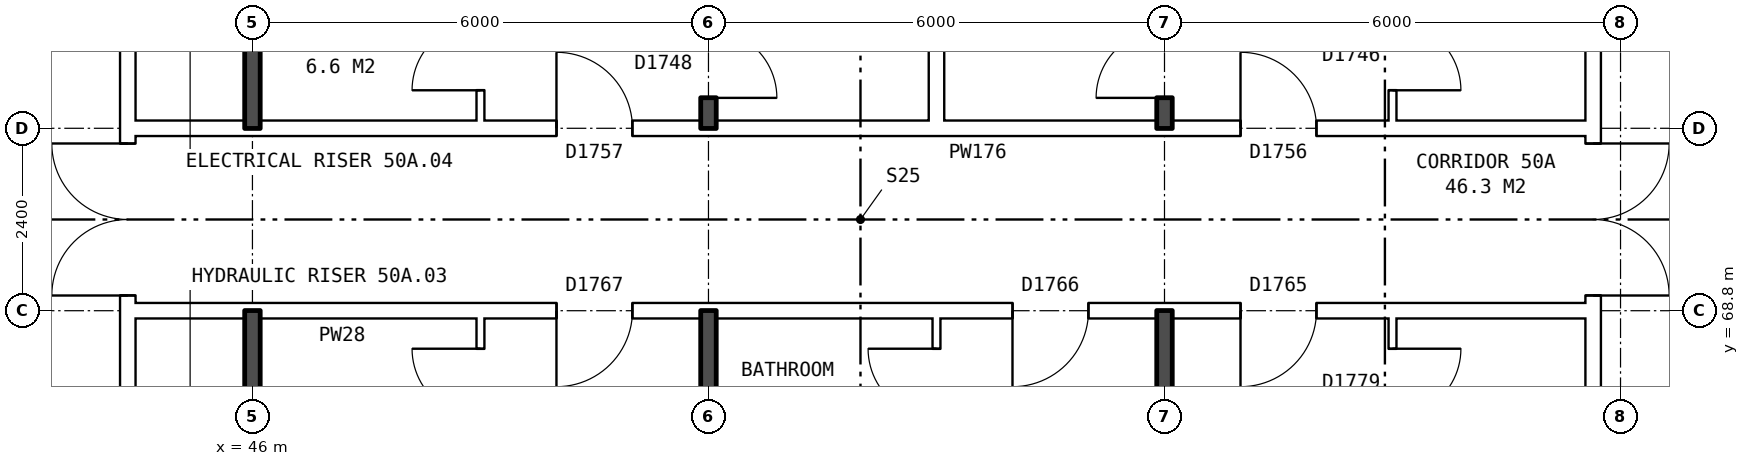
"""IFC4 building model, lengths in metres.
Left out: names, types, materials, properties, quantities, classifications, styles, units other than length and angle.
Written with IfcOpenShell. Run it as: python <this file> out.ifc"""

import sys

from ifc_helpers import new_model, si_unit, direction, frame, frame_2d, origin, place, context, subcontext, project, spatial, rectangle, extrude, element, fill, save


model = new_model("IFC4")
c1 = context("Model", 3, precision=1e-05, world=origin(), true_north=direction((0.0, 1.0)))
c2 = subcontext(c1, "Body", "Model", "MODEL_VIEW")
j1 = project(units=[si_unit("LENGTHUNIT", "METRE"), si_unit("PLANEANGLEUNIT", "RADIAN")], contexts=[c1])
p1 = place(None, origin())
s1 = spatial("IfcSite", under=j1, at=p1, CompositionType="ELEMENT")
p2 = place(p1, origin())
s2 = spatial("IfcBuilding", under=s1, at=p2, CompositionType="ELEMENT")
p3 = place(p2, frame((0.0, 0.0, 178.9)))
s3 = spatial("IfcBuildingStorey", under=s2, at=p3, CompositionType="ELEMENT", Elevation=178.9)
p4 = place(p3, frame((63.64, 63.9, 0.0), z_axis=(0.0, 0.0, 1.0), x_axis=(0.0, 1.0, 0.0)))
e1 = element("IfcWall", 1, at=p4, inside=s3, PredefinedType="PARTITIONING", context=c2, shape_type="SweptSolid", body=[
    extrude(rectangle(XDim=12.2, YDim=0.2, at=frame_2d((6.1, 0.0))), origin(), (0.0, 0.0, 1.0), 2.85),
])
p5 = place(p4, frame((5.1, 0.0, 0.0)))
e2 = element("IfcOpeningElement", 2, at=p5, cuts=e1, PredefinedType="OPENING", context=c2, shape_type="SweptSolid", body=[
    extrude(rectangle(XDim=2.0, YDim=2.1, at=frame_2d((1.0, 1.05))), frame((0.0, 0.11, 0.0), z_axis=(0.0, -1.0, 0.0), x_axis=(1.0, 0.0, 0.0)), (0.0, 0.0, 1.0), 0.22),
])
p6 = place(p3, frame((44.36, 63.9, 0.0), z_axis=(0.0, 0.0, 1.0), x_axis=(0.0, 1.0, 0.0)))
e3 = element("IfcWall", 3, at=p6, inside=s3, PredefinedType="PARTITIONING", context=c2, shape_type="SweptSolid", body=[
    extrude(rectangle(XDim=12.2, YDim=0.2, at=frame_2d((6.1, 0.0))), origin(), (0.0, 0.0, 1.0), 2.85),
])
p7 = place(p6, frame((5.1, 0.0, 0.0)))
e4 = element("IfcOpeningElement", 4, at=p7, cuts=e3, PredefinedType="OPENING", context=c2, shape_type="SweptSolid", body=[
    extrude(rectangle(XDim=2.0, YDim=2.1, at=frame_2d((1.0, 1.05))), frame((0.0, 0.11, 0.0), z_axis=(0.0, -1.0, 0.0), x_axis=(1.0, 0.0, 0.0)), (0.0, 0.0, 1.0), 0.22),
])
p8 = place(p3, frame((44.36, 68.8, 0.0), z_axis=(0.0, 0.0, 1.0), x_axis=(1.0, 0.0, 0.0)))
e5 = element("IfcWall", 5, at=p8, inside=s3, PredefinedType="PARTITIONING", context=c2, shape_type="SweptSolid", body=[
    extrude(rectangle(XDim=19.28, YDim=0.2, at=frame_2d((9.64, 0.0))), origin(), (0.0, 0.0, 1.0), 2.85),
])
p9 = place(p8, frame((14.64, 0.0, 0.0)))
e6 = element("IfcOpeningElement", 6, at=p9, cuts=e5, PredefinedType="OPENING", context=c2, shape_type="SweptSolid", body=[
    extrude(rectangle(XDim=1.0, YDim=2.1, at=frame_2d((0.5, 1.05))), frame((0.0, 0.11, 0.0), z_axis=(0.0, -1.0, 0.0), x_axis=(1.0, 0.0, 0.0)), (0.0, 0.0, 1.0), 0.22),
])
p10 = place(p8, frame((11.64, 0.0, 0.0)))
e7 = element("IfcOpeningElement", 7, at=p10, cuts=e5, PredefinedType="OPENING", context=c2, shape_type="SweptSolid", body=[
    extrude(rectangle(XDim=1.0, YDim=2.1, at=frame_2d((0.5, 1.05))), frame((0.0, 0.11, 0.0), z_axis=(0.0, -1.0, 0.0), x_axis=(1.0, 0.0, 0.0)), (0.0, 0.0, 1.0), 0.22),
])
p11 = place(p8, frame((5.64, 0.0, 0.0)))
e8 = element("IfcOpeningElement", 8, at=p11, cuts=e5, PredefinedType="OPENING", context=c2, shape_type="SweptSolid", body=[
    extrude(rectangle(XDim=1.0, YDim=2.1, at=frame_2d((0.5, 1.05))), frame((0.0, 0.11, 0.0), z_axis=(0.0, -1.0, 0.0), x_axis=(1.0, 0.0, 0.0)), (0.0, 0.0, 1.0), 0.22),
])
p12 = place(p3, frame((44.36, 71.2, 0.0), z_axis=(0.0, 0.0, 1.0), x_axis=(1.0, 0.0, 0.0)))
e9 = element("IfcWall", 9, at=p12, inside=s3, PredefinedType="PARTITIONING", context=c2, shape_type="SweptSolid", body=[
    extrude(rectangle(XDim=19.28, YDim=0.2, at=frame_2d((9.64, 0.0))), origin(), (0.0, 0.0, 1.0), 2.85),
])
p13 = place(p12, frame((14.64, 0.0, 0.0)))
e10 = element("IfcOpeningElement", 10, at=p13, cuts=e9, PredefinedType="OPENING", context=c2, shape_type="SweptSolid", body=[
    extrude(rectangle(XDim=1.0, YDim=2.1, at=frame_2d((0.5, 1.05))), frame((0.0, 0.11, 0.0), z_axis=(0.0, -1.0, 0.0), x_axis=(1.0, 0.0, 0.0)), (0.0, 0.0, 1.0), 0.22),
])
p14 = place(p12, frame((5.64, 0.0, 0.0)))
e11 = element("IfcOpeningElement", 11, at=p14, cuts=e9, PredefinedType="OPENING", context=c2, shape_type="SweptSolid", body=[
    extrude(rectangle(XDim=1.0, YDim=2.1, at=frame_2d((0.5, 1.05))), frame((0.0, 0.11, 0.0), z_axis=(0.0, -1.0, 0.0), x_axis=(1.0, 0.0, 0.0)), (0.0, 0.0, 1.0), 0.22),
])
for number, where, z_axis, x_axis in (
    (12, (46.0, 63.8, 0.0), (0.0, 0.0, 1.0), (0.0, 1.0, 0.0)),
    (13, (46.0, 71.2, 0.0), (0.0, 0.0, 1.0), (0.0, 1.0, 0.0)),
):
    element("IfcWall", number, at=place(p3, frame(where, z_axis=z_axis, x_axis=x_axis)), inside=s3, PredefinedType="SOLIDWALL", context=c2, shape_type="SweptSolid", body=[
        extrude(rectangle(XDim=5.0, YDim=0.2, at=frame_2d((2.5, 0.0))), origin(), (0.0, 0.0, 1.0), 2.85),
    ])
p15 = place(p3, frame((49.0, 54.36, 0.0), z_axis=(0.0, 0.0, 1.0), x_axis=(0.0, 1.0, 0.0)))
e14 = element("IfcWall", 14, at=p15, inside=s3, PredefinedType="PARTITIONING", context=c2, shape_type="SweptSolid", body=[
    extrude(rectangle(XDim=14.34, YDim=0.1, at=frame_2d((7.17, 0.0))), origin(), (0.0, 0.0, 1.0), 2.85),
])
p16 = place(p15, frame((6.7, 0.0, 0.0)))
e15 = element("IfcOpeningElement", 15, at=p16, cuts=e14, PredefinedType="OPENING", context=c2, shape_type="SweptSolid", body=[
    extrude(rectangle(XDim=0.9, YDim=2.1, at=frame_2d((0.45, 1.05))), frame((0.0, 0.06, 0.0), z_axis=(0.0, -1.0, 0.0), x_axis=(1.0, 0.0, 0.0)), (0.0, 0.0, 1.0), 0.12),
])
p17 = place(p15, frame((13.04, 0.0, 0.0)))
e16 = element("IfcOpeningElement", 16, at=p17, cuts=e14, PredefinedType="OPENING", context=c2, shape_type="SweptSolid", body=[
    extrude(rectangle(XDim=0.9, YDim=2.1, at=frame_2d((0.45, 1.05))), frame((0.0, 0.06, 0.0), z_axis=(0.0, -1.0, 0.0), x_axis=(1.0, 0.0, 0.0)), (0.0, 0.0, 1.0), 0.12),
])
p18 = place(p3, frame((49.0, 71.3, 0.0), z_axis=(0.0, 0.0, 1.0), x_axis=(0.0, 1.0, 0.0)))
e17 = element("IfcWall", 17, at=p18, inside=s3, PredefinedType="PARTITIONING", context=c2, shape_type="SweptSolid", body=[
    extrude(rectangle(XDim=14.34, YDim=0.1, at=frame_2d((7.17, 0.0))), origin(), (0.0, 0.0, 1.0), 2.85),
])
p19 = place(p18, frame((9.24, 0.0, 0.0)))
e18 = element("IfcOpeningElement", 18, at=p19, cuts=e17, PredefinedType="OPENING", context=c2, shape_type="SweptSolid", body=[
    extrude(rectangle(XDim=0.9, YDim=2.1, at=frame_2d((0.45, 1.05))), frame((0.0, 0.06, 0.0), z_axis=(0.0, -1.0, 0.0), x_axis=(1.0, 0.0, 0.0)), (0.0, 0.0, 1.0), 0.12),
])
p20 = place(p18, frame((0.4, 0.0, 0.0)))
e19 = element("IfcOpeningElement", 19, at=p20, cuts=e17, PredefinedType="OPENING", context=c2, shape_type="SweptSolid", body=[
    extrude(rectangle(XDim=0.9, YDim=2.1, at=frame_2d((0.45, 1.05))), frame((0.0, 0.06, 0.0), z_axis=(0.0, -1.0, 0.0), x_axis=(1.0, 0.0, 0.0)), (0.0, 0.0, 1.0), 0.12),
])
p21 = place(p3, frame((52.0, 54.36, 0.0), z_axis=(0.0, 0.0, 1.0), x_axis=(0.0, 1.0, 0.0)))
e20 = element("IfcWall", 20, at=p21, inside=s3, PredefinedType="SOLIDWALL", context=c2, shape_type="SweptSolid", body=[
    extrude(rectangle(XDim=14.44, YDim=0.2, at=frame_2d((7.22, 0.0))), origin(), (0.0, 0.0, 1.0), 2.85),
])
p22 = place(p3, frame((52.0, 71.2, 0.0), z_axis=(0.0, 0.0, 1.0), x_axis=(0.0, 1.0, 0.0)))
e21 = element("IfcWall", 21, at=p22, inside=s3, PredefinedType="SOLIDWALL", context=c2, shape_type="SweptSolid", body=[
    extrude(rectangle(XDim=14.44, YDim=0.2, at=frame_2d((7.22, 0.0))), origin(), (0.0, 0.0, 1.0), 2.85),
])
p23 = place(p22, frame((9.34, 0.0, 0.0)))
e22 = element("IfcOpeningElement", 22, at=p23, cuts=e21, PredefinedType="OPENING", context=c2, shape_type="SweptSolid", body=[
    extrude(rectangle(XDim=0.9, YDim=2.1, at=frame_2d((0.45, 1.05))), frame((0.0, 0.11, 0.0), z_axis=(0.0, -1.0, 0.0), x_axis=(1.0, 0.0, 0.0)), (0.0, 0.0, 1.0), 0.22),
])
p24 = place(p22, frame((0.4, 0.0, 0.0)))
e23 = element("IfcOpeningElement", 23, at=p24, cuts=e21, PredefinedType="OPENING", context=c2, shape_type="SweptSolid", body=[
    extrude(rectangle(XDim=0.9, YDim=2.1, at=frame_2d((0.45, 1.05))), frame((0.0, 0.11, 0.0), z_axis=(0.0, -1.0, 0.0), x_axis=(1.0, 0.0, 0.0)), (0.0, 0.0, 1.0), 0.22),
])
p25 = place(p3, frame((55.0, 54.36, 0.0), z_axis=(0.0, 0.0, 1.0), x_axis=(0.0, 1.0, 0.0)))
e24 = element("IfcWall", 24, at=p25, inside=s3, PredefinedType="PARTITIONING", context=c2, shape_type="SweptSolid", body=[
    extrude(rectangle(XDim=14.34, YDim=0.1, at=frame_2d((7.17, 0.0))), origin(), (0.0, 0.0, 1.0), 2.85),
])
p26 = place(p25, frame((4.2, 0.0, 0.0)))
e25 = element("IfcOpeningElement", 25, at=p26, cuts=e24, PredefinedType="OPENING", context=c2, shape_type="SweptSolid", body=[
    extrude(rectangle(XDim=0.9, YDim=2.1, at=frame_2d((0.45, 1.05))), frame((0.0, 0.06, 0.0), z_axis=(0.0, -1.0, 0.0), x_axis=(1.0, 0.0, 0.0)), (0.0, 0.0, 1.0), 0.12),
])
p27 = place(p25, frame((13.04, 0.0, 0.0)))
e26 = element("IfcOpeningElement", 26, at=p27, cuts=e24, PredefinedType="OPENING", context=c2, shape_type="SweptSolid", body=[
    extrude(rectangle(XDim=0.9, YDim=2.1, at=frame_2d((0.45, 1.05))), frame((0.0, 0.06, 0.0), z_axis=(0.0, -1.0, 0.0), x_axis=(1.0, 0.0, 0.0)), (0.0, 0.0, 1.0), 0.12),
])
p28 = place(p3, frame((55.0, 71.3, 0.0), z_axis=(0.0, 0.0, 1.0), x_axis=(0.0, 1.0, 0.0)))
e27 = element("IfcWall", 27, at=p28, inside=s3, PredefinedType="PARTITIONING", context=c2, shape_type="SweptSolid", body=[
    extrude(rectangle(XDim=14.34, YDim=0.2, at=frame_2d((7.17, 0.0))), origin(), (0.0, 0.0, 1.0), 2.85),
])
p29 = place(p3, frame((58.0, 54.36, 0.0), z_axis=(0.0, 0.0, 1.0), x_axis=(0.0, 1.0, 0.0)))
e28 = element("IfcWall", 28, at=p29, inside=s3, PredefinedType="SOLIDWALL", context=c2, shape_type="SweptSolid", body=[
    extrude(rectangle(XDim=14.44, YDim=0.2, at=frame_2d((7.22, 0.0))), origin(), (0.0, 0.0, 1.0), 2.85),
])
p30 = place(p3, frame((58.0, 71.2, 0.0), z_axis=(0.0, 0.0, 1.0), x_axis=(0.0, 1.0, 0.0)))
e29 = element("IfcWall", 29, at=p30, inside=s3, PredefinedType="SOLIDWALL", context=c2, shape_type="SweptSolid", body=[
    extrude(rectangle(XDim=14.44, YDim=0.2, at=frame_2d((7.22, 0.0))), origin(), (0.0, 0.0, 1.0), 2.85),
])
p31 = place(p30, frame((9.34, 0.0, 0.0)))
e30 = element("IfcOpeningElement", 30, at=p31, cuts=e29, PredefinedType="OPENING", context=c2, shape_type="SweptSolid", body=[
    extrude(rectangle(XDim=0.9, YDim=2.1, at=frame_2d((0.45, 1.05))), frame((0.0, 0.11, 0.0), z_axis=(0.0, -1.0, 0.0), x_axis=(1.0, 0.0, 0.0)), (0.0, 0.0, 1.0), 0.22),
])
p32 = place(p30, frame((0.4, 0.0, 0.0)))
e31 = element("IfcOpeningElement", 31, at=p32, cuts=e29, PredefinedType="OPENING", context=c2, shape_type="SweptSolid", body=[
    extrude(rectangle(XDim=0.9, YDim=2.1, at=frame_2d((0.45, 1.05))), frame((0.0, 0.11, 0.0), z_axis=(0.0, -1.0, 0.0), x_axis=(1.0, 0.0, 0.0)), (0.0, 0.0, 1.0), 0.22),
])
p33 = place(p3, frame((61.0, 54.36, 0.0), z_axis=(0.0, 0.0, 1.0), x_axis=(0.0, 1.0, 0.0)))
e32 = element("IfcWall", 32, at=p33, inside=s3, PredefinedType="PARTITIONING", context=c2, shape_type="SweptSolid", body=[
    extrude(rectangle(XDim=14.34, YDim=0.1, at=frame_2d((7.17, 0.0))), origin(), (0.0, 0.0, 1.0), 2.85),
])
p34 = place(p33, frame((6.7, 0.0, 0.0)))
e33 = element("IfcOpeningElement", 33, at=p34, cuts=e32, PredefinedType="OPENING", context=c2, shape_type="SweptSolid", body=[
    extrude(rectangle(XDim=0.9, YDim=2.1, at=frame_2d((0.45, 1.05))), frame((0.0, 0.06, 0.0), z_axis=(0.0, -1.0, 0.0), x_axis=(1.0, 0.0, 0.0)), (0.0, 0.0, 1.0), 0.12),
])
p35 = place(p33, frame((13.04, 0.0, 0.0)))
e34 = element("IfcOpeningElement", 34, at=p35, cuts=e32, PredefinedType="OPENING", context=c2, shape_type="SweptSolid", body=[
    extrude(rectangle(XDim=0.9, YDim=2.1, at=frame_2d((0.45, 1.05))), frame((0.0, 0.06, 0.0), z_axis=(0.0, -1.0, 0.0), x_axis=(1.0, 0.0, 0.0)), (0.0, 0.0, 1.0), 0.12),
])
p36 = place(p3, frame((61.0, 71.3, 0.0), z_axis=(0.0, 0.0, 1.0), x_axis=(0.0, 1.0, 0.0)))
e35 = element("IfcWall", 35, at=p36, inside=s3, PredefinedType="PARTITIONING", context=c2, shape_type="SweptSolid", body=[
    extrude(rectangle(XDim=14.34, YDim=0.1, at=frame_2d((7.17, 0.0))), origin(), (0.0, 0.0, 1.0), 2.85),
])
p37 = place(p36, frame((9.24, 0.0, 0.0)))
e36 = element("IfcOpeningElement", 36, at=p37, cuts=e35, PredefinedType="OPENING", context=c2, shape_type="SweptSolid", body=[
    extrude(rectangle(XDim=0.9, YDim=2.1, at=frame_2d((0.45, 1.05))), frame((0.0, 0.06, 0.0), z_axis=(0.0, -1.0, 0.0), x_axis=(1.0, 0.0, 0.0)), (0.0, 0.0, 1.0), 0.12),
])
p38 = place(p36, frame((0.4, 0.0, 0.0)))
e37 = element("IfcOpeningElement", 37, at=p38, cuts=e35, PredefinedType="OPENING", context=c2, shape_type="SweptSolid", body=[
    extrude(rectangle(XDim=0.9, YDim=2.1, at=frame_2d((0.45, 1.05))), frame((0.0, 0.06, 0.0), z_axis=(0.0, -1.0, 0.0), x_axis=(1.0, 0.0, 0.0)), (0.0, 0.0, 1.0), 0.12),
])
p39 = place(p5, frame((2.0, 0.0, 0.0), z_axis=(0.0, 0.0, 1.0), x_axis=(-1.0, 0.0, 0.0)))
e38 = element("IfcDoor", 38, at=p39, inside=s3, OperationType="DOUBLE_DOOR_SINGLE_SWING", PredefinedType="DOOR", context=c2, shape_type="SweptSolid", body=[
    extrude(rectangle(XDim=2.0, YDim=2.1, at=frame_2d((1.0, 1.05))), frame((0.0, 0.025, 0.0), z_axis=(0.0, -1.0, 0.0), x_axis=(1.0, 0.0, 0.0)), (0.0, 0.0, 1.0), 0.05),
])
fill(e2, e38)
p40 = place(p7, origin())
e39 = element("IfcDoor", 39, at=p40, inside=s3, OperationType="DOUBLE_DOOR_SINGLE_SWING", PredefinedType="DOOR", context=c2, shape_type="SweptSolid", body=[
    extrude(rectangle(XDim=2.0, YDim=2.1, at=frame_2d((1.0, 1.05))), frame((0.0, 0.025, 0.0), z_axis=(0.0, -1.0, 0.0), x_axis=(1.0, 0.0, 0.0)), (0.0, 0.0, 1.0), 0.05),
])
fill(e4, e39)
p41 = place(p9, frame((1.0, 0.0, 0.0), z_axis=(0.0, 0.0, 1.0), x_axis=(-1.0, 0.0, 0.0)))
e40 = element("IfcDoor", 40, at=p41, inside=s3, OperationType="SINGLE_SWING_RIGHT", PredefinedType="DOOR", context=c2, shape_type="SweptSolid", body=[
    extrude(rectangle(XDim=1.0, YDim=2.1, at=frame_2d((0.5, 1.05))), frame((0.0, 0.025, 0.0), z_axis=(0.0, -1.0, 0.0), x_axis=(1.0, 0.0, 0.0)), (0.0, 0.0, 1.0), 0.05),
])
fill(e6, e40)
p42 = place(p35, frame((0.9, 0.0, 0.0), z_axis=(0.0, 0.0, 1.0), x_axis=(-1.0, 0.0, 0.0)))
e41 = element("IfcDoor", 41, at=p42, inside=s3, OperationType="SINGLE_SWING_LEFT", PredefinedType="DOOR", context=c2, shape_type="SweptSolid", body=[
    extrude(rectangle(XDim=0.9, YDim=2.1, at=frame_2d((0.45, 1.05))), frame((0.0, 0.025, 0.0), z_axis=(0.0, -1.0, 0.0), x_axis=(1.0, 0.0, 0.0)), (0.0, 0.0, 1.0), 0.05),
])
fill(e34, e41)
p43 = place(p10, frame((1.0, 0.0, 0.0), z_axis=(0.0, 0.0, 1.0), x_axis=(-1.0, 0.0, 0.0)))
e42 = element("IfcDoor", 42, at=p43, inside=s3, OperationType="SINGLE_SWING_RIGHT", PredefinedType="DOOR", context=c2, shape_type="SweptSolid", body=[
    extrude(rectangle(XDim=1.0, YDim=2.1, at=frame_2d((0.5, 1.05))), frame((0.0, 0.025, 0.0), z_axis=(0.0, -1.0, 0.0), x_axis=(1.0, 0.0, 0.0)), (0.0, 0.0, 1.0), 0.05),
])
fill(e7, e42)
p44 = place(p27, origin())
e43 = element("IfcDoor", 43, at=p44, inside=s3, OperationType="SINGLE_SWING_RIGHT", PredefinedType="DOOR", context=c2, shape_type="SweptSolid", body=[
    extrude(rectangle(XDim=0.9, YDim=2.1, at=frame_2d((0.45, 1.05))), frame((0.0, 0.025, 0.0), z_axis=(0.0, -1.0, 0.0), x_axis=(1.0, 0.0, 0.0)), (0.0, 0.0, 1.0), 0.05),
])
fill(e26, e43)
p45 = place(p11, frame((1.0, 0.0, 0.0), z_axis=(0.0, 0.0, 1.0), x_axis=(-1.0, 0.0, 0.0)))
e44 = element("IfcDoor", 44, at=p45, inside=s3, OperationType="SINGLE_SWING_RIGHT", PredefinedType="DOOR", context=c2, shape_type="SweptSolid", body=[
    extrude(rectangle(XDim=1.0, YDim=2.1, at=frame_2d((0.5, 1.05))), frame((0.0, 0.025, 0.0), z_axis=(0.0, -1.0, 0.0), x_axis=(1.0, 0.0, 0.0)), (0.0, 0.0, 1.0), 0.05),
])
fill(e8, e44)
p46 = place(p17, origin())
e45 = element("IfcDoor", 45, at=p46, inside=s3, OperationType="SINGLE_SWING_RIGHT", PredefinedType="DOOR", context=c2, shape_type="SweptSolid", body=[
    extrude(rectangle(XDim=0.9, YDim=2.1, at=frame_2d((0.45, 1.05))), frame((0.0, 0.025, 0.0), z_axis=(0.0, -1.0, 0.0), x_axis=(1.0, 0.0, 0.0)), (0.0, 0.0, 1.0), 0.05),
])
fill(e16, e45)
p47 = place(p13, origin())
e46 = element("IfcDoor", 46, at=p47, inside=s3, OperationType="SINGLE_SWING_LEFT", PredefinedType="DOOR", context=c2, shape_type="SweptSolid", body=[
    extrude(rectangle(XDim=1.0, YDim=2.1, at=frame_2d((0.5, 1.05))), frame((0.0, 0.025, 0.0), z_axis=(0.0, -1.0, 0.0), x_axis=(1.0, 0.0, 0.0)), (0.0, 0.0, 1.0), 0.05),
])
fill(e10, e46)
p48 = place(p38, frame((0.9, 0.0, 0.0), z_axis=(0.0, 0.0, 1.0), x_axis=(-1.0, 0.0, 0.0)))
e47 = element("IfcDoor", 47, at=p48, inside=s3, OperationType="SINGLE_SWING_RIGHT", PredefinedType="DOOR", context=c2, shape_type="SweptSolid", body=[
    extrude(rectangle(XDim=0.9, YDim=2.1, at=frame_2d((0.45, 1.05))), frame((0.0, 0.025, 0.0), z_axis=(0.0, -1.0, 0.0), x_axis=(1.0, 0.0, 0.0)), (0.0, 0.0, 1.0), 0.05),
])
fill(e37, e47)
p49 = place(p32, origin())
e48 = element("IfcDoor", 48, at=p49, inside=s3, OperationType="SINGLE_SWING_LEFT", PredefinedType="DOOR", context=c2, shape_type="SweptSolid", body=[
    extrude(rectangle(XDim=0.9, YDim=2.1, at=frame_2d((0.45, 1.05))), frame((0.0, 0.025, 0.0), z_axis=(0.0, -1.0, 0.0), x_axis=(1.0, 0.0, 0.0)), (0.0, 0.0, 1.0), 0.05),
])
fill(e31, e48)
p50 = place(p14, origin())
e49 = element("IfcDoor", 49, at=p50, inside=s3, OperationType="SINGLE_SWING_LEFT", PredefinedType="DOOR", context=c2, shape_type="SweptSolid", body=[
    extrude(rectangle(XDim=1.0, YDim=2.1, at=frame_2d((0.5, 1.05))), frame((0.0, 0.025, 0.0), z_axis=(0.0, -1.0, 0.0), x_axis=(1.0, 0.0, 0.0)), (0.0, 0.0, 1.0), 0.05),
])
fill(e11, e49)
p51 = place(p24, frame((0.9, 0.0, 0.0), z_axis=(0.0, 0.0, 1.0), x_axis=(-1.0, 0.0, 0.0)))
e50 = element("IfcDoor", 50, at=p51, inside=s3, OperationType="SINGLE_SWING_RIGHT", PredefinedType="DOOR", context=c2, shape_type="SweptSolid", body=[
    extrude(rectangle(XDim=0.9, YDim=2.1, at=frame_2d((0.45, 1.05))), frame((0.0, 0.025, 0.0), z_axis=(0.0, -1.0, 0.0), x_axis=(1.0, 0.0, 0.0)), (0.0, 0.0, 1.0), 0.05),
])
fill(e23, e50)
p52 = place(p20, origin())
e51 = element("IfcDoor", 51, at=p52, inside=s3, OperationType="SINGLE_SWING_LEFT", PredefinedType="DOOR", context=c2, shape_type="SweptSolid", body=[
    extrude(rectangle(XDim=0.9, YDim=2.1, at=frame_2d((0.45, 1.05))), frame((0.0, 0.025, 0.0), z_axis=(0.0, -1.0, 0.0), x_axis=(1.0, 0.0, 0.0)), (0.0, 0.0, 1.0), 0.05),
])
fill(e19, e51)
save(model, sys.argv[1])
